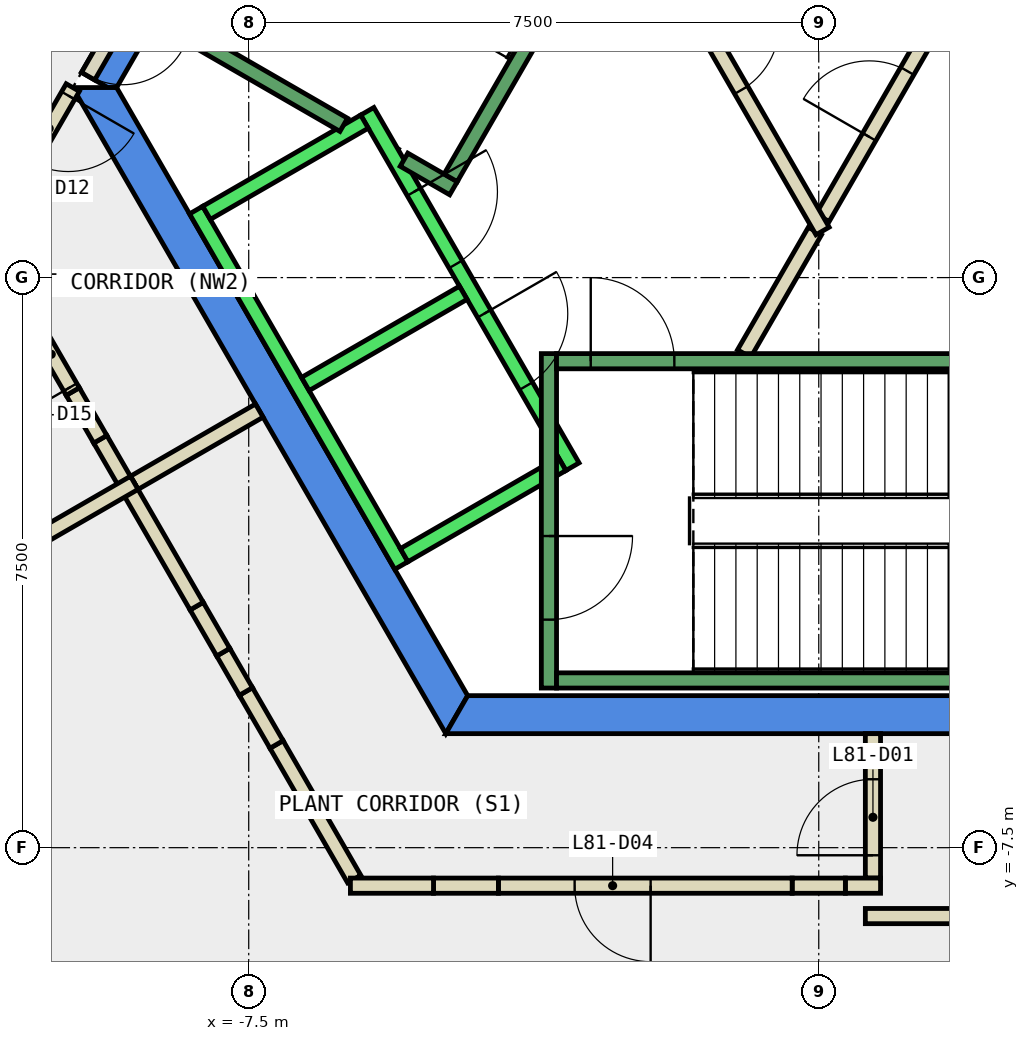
"""IFC4 building model, lengths in metres.
Left out: names, types, materials, properties, quantities, classifications, styles, units other than length and angle.
Written with IfcOpenShell. Run it as: python <this file> out.ifc"""

import sys

from ifc_helpers import new_model, si_unit, direction, frame, frame_2d, origin, place, context, subcontext, project, spatial, polyline, rectangle, outline, extrude, element, fill, save


model = new_model("IFC4")
c1 = context("Model", 3, precision=1e-05, world=origin(), true_north=direction((0.0, 1.0)))
c2 = subcontext(c1, "Body", "Model", "MODEL_VIEW")
j1 = project(units=[si_unit("LENGTHUNIT", "METRE"), si_unit("PLANEANGLEUNIT", "RADIAN")], contexts=[c1])
p1 = place(None, origin())
s1 = spatial("IfcSite", under=j1, at=p1, CompositionType="ELEMENT")
p2 = place(p1, origin())
s2 = spatial("IfcBuilding", under=s1, at=p2, CompositionType="ELEMENT")
p3 = place(p2, frame((0.0, 0.0, 344.9)))
s3 = spatial("IfcBuildingStorey", under=s2, at=p3, CompositionType="ELEMENT", Elevation=344.9)
p4 = place(p3, frame((0.0, 0.0, 3.6)))
e1 = element("IfcWall", 1, at=p4, inside=s3, PredefinedType="SHEAR", context=c2, shape_type="SweptSolid", body=[
    extrude(outline(polyline([(-9.7, 2.7), (-9.354, 2.5), (-9.238, 2.5), (-8.803, 3.253), (-9.236, 3.502), (-9.7, 2.7)])), origin(), (0.0, 0.0, 1.0), 0.45),
])
p5 = place(p3, frame((0.0, 0.0, -0.35)))
e2 = element("IfcWall", 2, at=p5, inside=s3, PredefinedType="SHEAR", context=c2, shape_type="SweptSolid", body=[
    extrude(outline(polyline([(-9.815, 2.5), (-4.907, -6.0), (-4.619, -5.5), (-9.238, 2.5), (-9.815, 2.5)])), origin(), (0.0, 0.0, 1.0), 4.4),
])
p6 = place(p3, frame((0.0, 0.0, -0.35)))
e3 = element("IfcWall", 3, at=p6, inside=s3, PredefinedType="SHEAR", context=c2, shape_type="SweptSolid", body=[
    extrude(outline(polyline([(3.75, -6.0), (3.75, -5.5), (-4.619, -5.5), (-4.907, -6.0), (3.75, -6.0)])), origin(), (0.0, 0.0, 1.0), 4.4),
])
p7 = place(p3, frame((-0.982, -1.0, 0.0), z_axis=(0.0, 0.0, 1.0), x_axis=(0.50024047865, 0.865886518847, 0.0)))
e4 = element("IfcWall", 4, at=p7, inside=s3, PredefinedType="PARTITIONING", context=c2, shape_type="SweptSolid", body=[
    extrude(rectangle(XDim=1.863, YDim=0.2, at=frame_2d((0.931, 0.0))), origin(), (0.0, 0.0, 1.0), 4.05),
])
p8 = place(p3, frame((0.05, 0.787, 0.0), z_axis=(0.0, 0.0, 1.0), x_axis=(0.499954076797, 0.866051915934, 0.0)))
e5 = element("IfcWall", 5, at=p8, inside=s3, PredefinedType="PARTITIONING", context=c2, shape_type="SweptSolid", body=[
    extrude(rectangle(XDim=3.558, YDim=0.2, at=frame_2d((1.779, 0.0))), origin(), (0.0, 0.0, 1.0), 4.05),
])
p9 = place(p8, frame((1.229, 0.0, 0.0)))
e6 = element("IfcOpeningElement", 6, at=p9, cuts=e5, PredefinedType="OPENING", context=c2, shape_type="SweptSolid", body=[
    extrude(rectangle(XDim=1.0, YDim=2.1, at=frame_2d((0.5, 1.05))), frame((0.0, 0.11, 0.0), z_axis=(0.0, -1.0, 0.0), x_axis=(1.0, 0.0, 0.0)), (0.0, 0.0, 1.0), 0.22),
])
p10 = place(p3, frame((-2.54, 5.1, 0.0), z_axis=(0.0, 0.0, 1.0), x_axis=(0.499925051871, -0.866068670783, 0.0)))
e7 = element("IfcWall", 7, at=p10, inside=s3, PredefinedType="PARTITIONING", context=c2, shape_type="SweptSolid", body=[
    extrude(rectangle(XDim=5.181, YDim=0.2, at=frame_2d((2.59, 0.0))), origin(), (0.0, 0.0, 1.0), 4.05),
])
p11 = place(p10, frame((2.04, 0.0, 0.0)))
e8 = element("IfcOpeningElement", 8, at=p11, cuts=e7, PredefinedType="OPENING", context=c2, shape_type="SweptSolid", body=[
    extrude(rectangle(XDim=1.0, YDim=2.1, at=frame_2d((0.5, 1.05))), frame((0.0, 0.11, 0.0), z_axis=(0.0, -1.0, 0.0), x_axis=(1.0, 0.0, 0.0)), (0.0, 0.0, 1.0), 0.22),
])
p12 = place(p3, frame((0.713, -7.9, 0.0), z_axis=(0.0, 0.0, 1.0), x_axis=(0.0, 1.0, 0.0)))
e9 = element("IfcWall", 9, at=p12, inside=s3, PredefinedType="PARTITIONING", context=c2, shape_type="SweptSolid", body=[
    extrude(rectangle(XDim=1.9, YDim=0.2, at=frame_2d((0.95, 0.0))), origin(), (0.0, 0.0, 1.0), 4.05),
])
p13 = place(p12, frame((0.3, 0.0, 0.0)))
e10 = element("IfcOpeningElement", 10, at=p13, cuts=e9, PredefinedType="OPENING", context=c2, shape_type="SweptSolid", body=[
    extrude(rectangle(XDim=1.0, YDim=2.1, at=frame_2d((0.5, 1.05))), frame((0.0, 0.11, 0.0), z_axis=(0.0, -1.0, 0.0), x_axis=(1.0, 0.0, 0.0)), (0.0, 0.0, 1.0), 0.22),
])
p14 = place(p3, frame((1.944, -8.4, 0.0), z_axis=(0.0, 0.0, 1.0), x_axis=(-1.0, 0.0, 0.0)))
e11 = element("IfcWall", 11, at=p14, inside=s3, PredefinedType="PARTITIONING", context=c2, shape_type="SweptSolid", body=[
    extrude(rectangle(XDim=1.331, YDim=0.2, at=frame_2d((0.666, 0.0))), origin(), (0.0, 0.0, 1.0), 4.05),
])
p15 = place(p3, frame((0.813, -8.0, 0.0), z_axis=(0.0, 0.0, 1.0), x_axis=(-1.0, 0.0, 0.0)))
e12 = element("IfcWall", 12, at=p15, inside=s3, PredefinedType="PARTITIONING", context=c2, shape_type="SweptSolid", body=[
    extrude(rectangle(XDim=0.463, YDim=0.2, at=frame_2d((0.231, 0.0))), origin(), (0.0, 0.0, 1.0), 4.05),
])
p16 = place(p3, frame((-6.112, -7.913, 0.0), z_axis=(0.0, 0.0, 1.0), x_axis=(-0.499812034598, 0.866133898465, 0.0)))
e13 = element("IfcWall", 13, at=p16, inside=s3, PredefinedType="PARTITIONING", context=c2, shape_type="SweptSolid", body=[
    extrude(rectangle(XDim=2.045, YDim=0.2, at=frame_2d((1.022, 0.0))), origin(), (0.0, 0.0, 1.0), 4.05),
])
p17 = place(p3, frame((-9.006, -2.7, 0.0), z_axis=(0.0, 0.0, 1.0), x_axis=(0.865980106173, 0.500078449558, 0.0)))
e14 = element("IfcWall", 14, at=p17, inside=s3, PredefinedType="PARTITIONING", context=c2, shape_type="SweptSolid", body=[
    extrude(rectangle(XDim=1.9, YDim=0.2, at=frame_2d((0.95, 0.0))), origin(), (0.0, 0.0, 1.0), 4.05),
])
p18 = place(p3, frame((-9.815, 2.5, 0.0), z_axis=(0.0, 0.0, 1.0), x_axis=(-0.500061536317, -0.86598987286, 0.0)))
e15 = element("IfcWall", 15, at=p18, inside=s3, PredefinedType="PARTITIONING", context=c2, shape_type="SweptSolid", body=[
    extrude(rectangle(XDim=2.41, YDim=0.2, at=frame_2d((1.205, 0.0))), origin(), (0.0, 0.0, 1.0), 4.05),
])
p19 = place(p18, frame((0.121, 0.0, 0.0)))
e16 = element("IfcOpeningElement", 16, at=p19, cuts=e15, PredefinedType="OPENING", context=c2, shape_type="SweptSolid", body=[
    extrude(rectangle(XDim=1.0, YDim=2.1, at=frame_2d((0.5, 1.05))), frame((0.0, 0.11, 0.0), z_axis=(0.0, -1.0, 0.0), x_axis=(1.0, 0.0, 0.0)), (0.0, 0.0, 1.0), 0.22),
])
p20 = place(p3, frame((-9.093, -2.75, 0.0), z_axis=(0.0, 0.0, 1.0), x_axis=(-0.500153222552, 0.865936922628, 0.0)))
e17 = element("IfcWall", 17, at=p20, inside=s3, PredefinedType="PARTITIONING", context=c2, shape_type="SweptSolid", body=[
    extrude(rectangle(XDim=0.719, YDim=0.2, at=frame_2d((0.36, 0.0))), origin(), (0.0, 0.0, 1.0), 4.05),
])
p21 = place(p3, frame((-9.15, 3.452, 0.0), z_axis=(0.0, 0.0, 1.0), x_axis=(-0.500079945886, -0.865979242085, 0.0)))
e18 = element("IfcWall", 18, at=p21, inside=s3, PredefinedType="PARTITIONING", context=c2, shape_type="SweptSolid", body=[
    extrude(rectangle(XDim=0.926, YDim=0.2, at=frame_2d((0.463, 0.0))), origin(), (0.0, 0.0, 1.0), 2.4),
])
p22 = place(p21, frame((0.017, 0.0, 0.0)))
e19 = element("IfcOpeningElement", 19, at=p22, cuts=e18, PredefinedType="OPENING", context=c2, shape_type="SweptSolid", body=[
    extrude(rectangle(XDim=0.9, YDim=2.1, at=frame_2d((0.45, 1.05))), frame((0.0, 0.11, 0.0), z_axis=(0.0, -1.0, 0.0), x_axis=(1.0, 0.0, 0.0)), (0.0, 0.0, 1.0), 0.22),
])
p23 = place(p3, frame((0.35, -8.0, 0.0), z_axis=(0.0, 0.0, 1.0), x_axis=(-1.0, 0.0, 0.0)))
e20 = element("IfcWall", 20, at=p23, inside=s3, PredefinedType="PARTITIONING", context=c2, shape_type="SweptSolid", body=[
    extrude(rectangle(XDim=0.7, YDim=0.2, at=frame_2d((0.35, 0.0))), origin(), (0.0, 0.0, 1.0), 1.95),
])
p24 = place(p3, frame((-0.35, -8.0, 0.0), z_axis=(0.0, 0.0, 1.0), x_axis=(-1.0, 0.0, 0.0)))
e21 = element("IfcWall", 21, at=p24, inside=s3, PredefinedType="PARTITIONING", context=c2, shape_type="SweptSolid", body=[
    extrude(rectangle(XDim=3.865, YDim=0.2, at=frame_2d((1.933, 0.0))), origin(), (0.0, 0.0, 1.0), 4.05),
])
p25 = place(p24, frame((1.862, 0.0, 0.0)))
e22 = element("IfcOpeningElement", 22, at=p25, cuts=e21, PredefinedType="OPENING", context=c2, shape_type="SweptSolid", body=[
    extrude(rectangle(XDim=1.0, YDim=2.1, at=frame_2d((0.5, 1.05))), frame((0.0, 0.11, 0.0), z_axis=(0.0, -1.0, 0.0), x_axis=(1.0, 0.0, 0.0)), (0.0, 0.0, 1.0), 0.22),
])
p26 = place(p3, frame((-4.215, -8.0, 0.0), z_axis=(0.0, 0.0, 1.0), x_axis=(-1.0, 0.0, 0.0)))
e23 = element("IfcWall", 23, at=p26, inside=s3, PredefinedType="PARTITIONING", context=c2, shape_type="SweptSolid", body=[
    extrude(rectangle(XDim=0.854, YDim=0.2, at=frame_2d((0.427, 0.0))), origin(), (0.0, 0.0, 1.0), 1.95),
])
p27 = place(p3, frame((-5.069, -8.0, 0.0), z_axis=(0.0, 0.0, 1.0), x_axis=(-1.0, 0.0, 0.0)))
e24 = element("IfcWall", 24, at=p27, inside=s3, PredefinedType="PARTITIONING", context=c2, shape_type="SweptSolid", body=[
    extrude(rectangle(XDim=1.093, YDim=0.2, at=frame_2d((0.546, 0.0))), origin(), (0.0, 0.0, 1.0), 4.05),
])
p28 = place(p3, frame((-7.134, -6.142, 0.0), z_axis=(0.0, 0.0, 1.0), x_axis=(-0.500605921862, 0.865675291894, 0.0)))
e25 = element("IfcWall", 25, at=p28, inside=s3, PredefinedType="PARTITIONING", context=c2, shape_type="SweptSolid", body=[
    extrude(rectangle(XDim=0.805, YDim=0.2, at=frame_2d((0.403, 0.0))), origin(), (0.0, 0.0, 1.0), 1.95),
])
p29 = place(p3, frame((-7.537, -5.445, 0.0), z_axis=(0.0, 0.0, 1.0), x_axis=(-0.499132035552, 0.866525943689, 0.0)))
e26 = element("IfcWall", 26, at=p29, inside=s3, PredefinedType="PARTITIONING", context=c2, shape_type="SweptSolid", body=[
    extrude(rectangle(XDim=0.597, YDim=0.2, at=frame_2d((0.298, 0.0))), origin(), (0.0, 0.0, 1.0), 4.05),
])
p30 = place(p3, frame((-7.835, -4.928, 0.0), z_axis=(0.0, 0.0, 1.0), x_axis=(-0.500265973451, 0.865871789474, 0.0)))
e27 = element("IfcWall", 27, at=p30, inside=s3, PredefinedType="PARTITIONING", context=c2, shape_type="SweptSolid", body=[
    extrude(rectangle(XDim=0.7, YDim=0.2, at=frame_2d((0.35, 0.0))), origin(), (0.0, 0.0, 1.0), 1.95),
])
p31 = place(p3, frame((-8.185, -4.322, 0.0), z_axis=(0.0, 0.0, 1.0), x_axis=(-0.500145398563, 0.865941441609, 0.0)))
e28 = element("IfcWall", 28, at=p31, inside=s3, PredefinedType="PARTITIONING", context=c2, shape_type="SweptSolid", body=[
    extrude(rectangle(XDim=1.815, YDim=0.2, at=frame_2d((0.908, 0.0))), origin(), (0.0, 0.0, 1.0), 4.05),
])
p32 = place(p3, frame((-18.407, -8.127, 0.0), z_axis=(0.0, 0.0, 1.0), x_axis=(0.866049258168, 0.49995868072, 0.0)))
e29 = element("IfcWall", 29, at=p32, inside=s3, PredefinedType="PARTITIONING", context=c2, shape_type="SweptSolid", body=[
    extrude(rectangle(XDim=10.855, YDim=0.2, at=frame_2d((5.427, 0.0))), origin(), (0.0, 0.0, 1.0), 4.05),
])
p33 = place(p3, frame((-9.453, -2.127, 0.0), z_axis=(0.0, 0.0, 1.0), x_axis=(-0.499508606083, 0.866308924373, 0.0)))
e30 = element("IfcWall", 30, at=p33, inside=s3, PredefinedType="PARTITIONING", context=c2, shape_type="SweptSolid", body=[
    extrude(rectangle(XDim=0.725, YDim=0.2, at=frame_2d((0.362, 0.0))), origin(), (0.0, 0.0, 1.0), 1.95),
])
p34 = place(p3, frame((-9.815, -1.499, 0.0), z_axis=(0.0, 0.0, 1.0), x_axis=(-0.50057098838, 0.865695492418, 0.0)))
e31 = element("IfcWall", 31, at=p34, inside=s3, PredefinedType="PARTITIONING", context=c2, shape_type="SweptSolid", body=[
    extrude(rectangle(XDim=1.345, YDim=0.2, at=frame_2d((0.672, 0.0))), origin(), (0.0, 0.0, 1.0), 4.05),
])
p35 = place(p34, frame((0.066, 0.0, 0.0)))
e32 = element("IfcOpeningElement", 32, at=p35, cuts=e31, PredefinedType="OPENING", context=c2, shape_type="SweptSolid", body=[
    extrude(rectangle(XDim=1.0, YDim=2.1, at=frame_2d((0.5, 1.05))), frame((0.0, 0.11, 0.0), z_axis=(0.0, -1.0, 0.0), x_axis=(1.0, 0.0, 0.0)), (0.0, 0.0, 1.0), 0.22),
])
p36 = place(p3, frame((-5.94, 2.188, 0.0), z_axis=(0.0, 0.0, 1.0), x_axis=(0.500034260056, -0.866005622828, 0.0)))
e33 = element("IfcWall", 33, at=p36, inside=s3, PredefinedType="STANDARD", context=c2, shape_type="SweptSolid", body=[
    extrude(rectangle(XDim=5.399, YDim=0.2, at=frame_2d((2.7, 0.0))), origin(), (0.0, 0.0, 1.0), 4.05),
])
p37 = place(p36, frame((3.075, 0.0, 0.0)))
e34 = element("IfcOpeningElement", 34, at=p37, cuts=e33, PredefinedType="OPENING", context=c2, shape_type="SweptSolid", body=[
    extrude(rectangle(XDim=1.1, YDim=2.1, at=frame_2d((0.55, 1.05))), frame((0.0, 0.11, 0.0), z_axis=(0.0, -1.0, 0.0), x_axis=(1.0, 0.0, 0.0)), (0.0, 0.0, 1.0), 0.22),
])
p38 = place(p36, frame((1.225, 0.0, 0.0)))
e35 = element("IfcOpeningElement", 35, at=p38, cuts=e33, PredefinedType="OPENING", context=c2, shape_type="SweptSolid", body=[
    extrude(rectangle(XDim=1.1, YDim=2.1, at=frame_2d((0.55, 1.05))), frame((0.0, 0.11, 0.0), z_axis=(0.0, -1.0, 0.0), x_axis=(1.0, 0.0, 0.0)), (0.0, 0.0, 1.0), 0.22),
])
p39 = place(p3, frame((-8.192, 0.888, 0.0), z_axis=(0.0, 0.0, 1.0), x_axis=(0.500034260056, -0.866005622828, 0.0)))
e36 = element("IfcWall", 36, at=p39, inside=s3, PredefinedType="STANDARD", context=c2, shape_type="SweptSolid", body=[
    extrude(rectangle(XDim=5.399, YDim=0.2, at=frame_2d((2.7, 0.0))), origin(), (0.0, 0.0, 1.0), 4.05),
])
for number, where, z_axis, x_axis in (
    (37, (-5.977, 2.052, 0.0), (0.0, 0.0, 1.0), (-0.866, -0.5, 0.0)),
    (38, (-4.677, -0.2, 0.0), (0.0, 0.0, 1.0), (-0.866, -0.5, 0.0)),
):
    element("IfcWall", number, at=place(p3, frame(where, z_axis=z_axis, x_axis=x_axis)), inside=s3, PredefinedType="STANDARD", context=c2, shape_type="SweptSolid", body=[
        extrude(rectangle(XDim=2.399, YDim=0.2, at=frame_2d((1.2, 0.0))), origin(), (0.0, 0.0, 1.0), 4.05),
    ])
p40 = place(p3, frame((-3.377, -2.452, 0.0), z_axis=(0.0, 0.0, 1.0), x_axis=(-0.865955154139, -0.50012165622, 0.0)))
e39 = element("IfcWall", 39, at=p40, inside=s3, PredefinedType="STANDARD", context=c2, shape_type="SweptSolid", body=[
    extrude(rectangle(XDim=2.4, YDim=0.2, at=frame_2d((1.2, 0.0))), origin(), (0.0, 0.0, 1.0), 4.05),
])
p41 = place(p3, frame((-3.55, -1.0, 0.0), z_axis=(0.0, 0.0, 1.0), x_axis=(0.0, -1.0, 0.0)))
e40 = element("IfcWall", 40, at=p41, inside=s3, PredefinedType="STANDARD", context=c2, shape_type="SweptSolid", body=[
    extrude(rectangle(XDim=4.4, YDim=0.2, at=frame_2d((2.2, 0.0))), origin(), (0.0, 0.0, 1.0), 4.05),
])
p42 = place(p41, frame((2.4, 0.0, 0.0)))
e41 = element("IfcOpeningElement", 41, at=p42, cuts=e40, PredefinedType="OPENING", context=c2, shape_type="SweptSolid", body=[
    extrude(rectangle(XDim=1.1, YDim=2.2, at=frame_2d((0.55, 1.1))), frame((0.0, 0.11, 0.0), z_axis=(0.0, -1.0, 0.0), x_axis=(1.0, 0.0, 0.0)), (0.0, 0.0, 1.0), 0.22),
])
p43 = place(p3, frame((-3.45, -1.1, 0.0), z_axis=(0.0, 0.0, 1.0), x_axis=(1.0, 0.0, 0.0)))
e42 = element("IfcWall", 42, at=p43, inside=s3, PredefinedType="STANDARD", context=c2, shape_type="SweptSolid", body=[
    extrude(rectangle(XDim=6.9, YDim=0.2, at=frame_2d((3.45, 0.0))), origin(), (0.0, 0.0, 1.0), 4.05),
])
p44 = place(p43, frame((0.45, 0.0, 0.0)))
e43 = element("IfcOpeningElement", 43, at=p44, cuts=e42, PredefinedType="OPENING", context=c2, shape_type="SweptSolid", body=[
    extrude(rectangle(XDim=1.1, YDim=2.2, at=frame_2d((0.55, 1.1))), frame((0.0, 0.11, 0.0), z_axis=(0.0, -1.0, 0.0), x_axis=(1.0, 0.0, 0.0)), (0.0, 0.0, 1.0), 0.22),
])
p45 = place(p3, frame((-3.45, -5.3, 0.0), z_axis=(0.0, 0.0, 1.0), x_axis=(1.0, 0.0, 0.0)))
e44 = element("IfcWall", 44, at=p45, inside=s3, PredefinedType="STANDARD", context=c2, shape_type="SweptSolid", body=[
    extrude(rectangle(XDim=6.9, YDim=0.2, at=frame_2d((3.45, 0.0))), origin(), (0.0, 0.0, 1.0), 4.05),
])
p46 = place(p3, frame((4.843, 1.312, 0.0), z_axis=(0.0, 0.0, 1.0), x_axis=(-0.499963383562, 0.866046543262, 0.0)))
e45 = element("IfcWall", 45, at=p46, inside=s3, PredefinedType="STANDARD", context=c2, shape_type="SweptSolid", body=[
    extrude(rectangle(XDim=6.9, YDim=0.2, at=frame_2d((3.45, 0.0))), origin(), (0.0, 0.0, 1.0), 4.05),
])
p47 = place(p46, frame((0.45, 0.0, 0.0)))
e46 = element("IfcOpeningElement", 46, at=p47, cuts=e45, PredefinedType="OPENING", context=c2, shape_type="SweptSolid", body=[
    extrude(rectangle(XDim=1.1, YDim=2.2, at=frame_2d((0.55, 1.1))), frame((0.0, 0.11, 0.0), z_axis=(0.0, -1.0, 0.0), x_axis=(1.0, 0.0, 0.0)), (0.0, 0.0, 1.0), 0.22),
])
p48 = place(p3, frame((-6.25, 2.01, 0.0), z_axis=(0.0, 0.0, 1.0), x_axis=(-0.86611865017, 0.499838457731, 0.0)))
e47 = element("IfcWall", 47, at=p48, inside=s3, PredefinedType="STANDARD", context=c2, shape_type="SweptSolid", body=[
    extrude(rectangle(XDim=2.733, YDim=0.2, at=frame_2d((1.366, 0.0))), origin(), (0.0, 0.0, 1.0), 4.05),
])
p49 = place(p3, frame((-4.806, 1.176, 0.0), z_axis=(0.0, 0.0, 1.0), x_axis=(-0.866558586415, 0.499075361355, 0.0)))
e48 = element("IfcWall", 48, at=p49, inside=s3, PredefinedType="STANDARD", context=c2, shape_type="SweptSolid", body=[
    extrude(rectangle(XDim=0.751, YDim=0.2, at=frame_2d((0.376, 0.0))), origin(), (0.0, 0.0, 1.0), 4.05),
])
p50 = place(p3, frame((-1.393, 7.288, 0.0), z_axis=(0.0, 0.0, 1.0), x_axis=(-0.499963383562, -0.866046543262, 0.0)))
e49 = element("IfcWall", 49, at=p50, inside=s3, PredefinedType="STANDARD", context=c2, shape_type="SweptSolid", body=[
    extrude(rectangle(XDim=6.9, YDim=0.2, at=frame_2d((3.45, 0.0))), origin(), (0.0, 0.0, 1.0), 4.05),
])
p51 = place(p50, frame((0.45, 0.0, 0.0)))
e50 = element("IfcOpeningElement", 50, at=p51, cuts=e49, PredefinedType="OPENING", context=c2, shape_type="SweptSolid", body=[
    extrude(rectangle(XDim=1.1, YDim=2.2, at=frame_2d((0.55, 1.1))), frame((0.0, 0.11, 0.0), z_axis=(0.0, -1.0, 0.0), x_axis=(1.0, 0.0, 0.0)), (0.0, 0.0, 1.0), 0.22),
])
p52 = place(p13, origin())
e51 = element("IfcDoor", 51, at=p52, inside=s3, OperationType="SINGLE_SWING_LEFT", PredefinedType="DOOR", context=c2, shape_type="SweptSolid", body=[
    extrude(rectangle(XDim=1.0, YDim=2.1, at=frame_2d((0.5, 1.05))), frame((0.0, 0.025, 0.0), z_axis=(0.0, -1.0, 0.0), x_axis=(1.0, 0.0, 0.0)), (0.0, 0.0, 1.0), 0.05),
])
fill(e10, e51)
p53 = place(p25, origin())
e52 = element("IfcDoor", 52, at=p53, inside=s3, OperationType="SINGLE_SWING_RIGHT", PredefinedType="DOOR", context=c2, shape_type="SweptSolid", body=[
    extrude(rectangle(XDim=1.0, YDim=2.1, at=frame_2d((0.5, 1.05))), frame((0.0, 0.025, 0.0), z_axis=(0.0, -1.0, 0.0), x_axis=(1.0, 0.0, 0.0)), (0.0, 0.0, 1.0), 0.05),
])
fill(e22, e52)
p54 = place(p19, origin())
e53 = element("IfcDoor", 53, at=p54, inside=s3, OperationType="SINGLE_SWING_RIGHT", PredefinedType="DOOR", context=c2, shape_type="SweptSolid", body=[
    extrude(rectangle(XDim=1.0, YDim=2.1, at=frame_2d((0.5, 1.05))), frame((0.0, 0.025, 0.0), z_axis=(0.0, -1.0, 0.0), x_axis=(1.0, 0.0, 0.0)), (0.0, 0.0, 1.0), 0.05),
])
fill(e16, e53)
p55 = place(p35, origin())
e54 = element("IfcDoor", 54, at=p55, inside=s3, OperationType="SINGLE_SWING_LEFT", PredefinedType="DOOR", context=c2, shape_type="SweptSolid", body=[
    extrude(rectangle(XDim=1.0, YDim=2.1, at=frame_2d((0.5, 1.05))), frame((0.0, 0.025, 0.0), z_axis=(0.0, -1.0, 0.0), x_axis=(1.0, 0.0, 0.0)), (0.0, 0.0, 1.0), 0.05),
])
fill(e32, e54)
p56 = place(p9, origin())
e55 = element("IfcDoor", 55, at=p56, inside=s3, OperationType="SINGLE_SWING_RIGHT", PredefinedType="DOOR", context=c2, shape_type="SweptSolid", body=[
    extrude(rectangle(XDim=1.0, YDim=2.1, at=frame_2d((0.5, 1.05))), frame((0.0, 0.025, 0.0), z_axis=(0.0, -1.0, 0.0), x_axis=(1.0, 0.0, 0.0)), (0.0, 0.0, 1.0), 0.05),
])
fill(e6, e55)
p57 = place(p11, origin())
e56 = element("IfcDoor", 56, at=p57, inside=s3, OperationType="SINGLE_SWING_RIGHT", PredefinedType="DOOR", context=c2, shape_type="SweptSolid", body=[
    extrude(rectangle(XDim=1.0, YDim=2.1, at=frame_2d((0.5, 1.05))), frame((0.0, 0.025, 0.0), z_axis=(0.0, -1.0, 0.0), x_axis=(1.0, 0.0, 0.0)), (0.0, 0.0, 1.0), 0.05),
])
fill(e8, e56)
p58 = place(p22, origin())
e57 = element("IfcDoor", 57, at=p58, inside=s3, OperationType="SINGLE_SWING_LEFT", PredefinedType="DOOR", context=c2, shape_type="SweptSolid", body=[
    extrude(rectangle(XDim=0.9, YDim=2.1, at=frame_2d((0.45, 1.05))), frame((0.0, 0.025, 0.0), z_axis=(0.0, -1.0, 0.0), x_axis=(1.0, 0.0, 0.0)), (0.0, 0.0, 1.0), 0.05),
])
fill(e19, e57)
p59 = place(p37, origin())
e58 = element("IfcDoor", 58, at=p59, inside=s3, OperationType="SLIDING_TO_LEFT", PredefinedType="DOOR", context=c2, shape_type="SweptSolid", body=[
    extrude(rectangle(XDim=1.1, YDim=2.1, at=frame_2d((0.55, 1.05))), frame((0.0, 0.025, 0.0), z_axis=(0.0, -1.0, 0.0), x_axis=(1.0, 0.0, 0.0)), (0.0, 0.0, 1.0), 0.05),
])
fill(e34, e58)
p60 = place(p38, origin())
e59 = element("IfcDoor", 59, at=p60, inside=s3, OperationType="SLIDING_TO_LEFT", PredefinedType="DOOR", context=c2, shape_type="SweptSolid", body=[
    extrude(rectangle(XDim=1.1, YDim=2.1, at=frame_2d((0.55, 1.05))), frame((0.0, 0.025, 0.0), z_axis=(0.0, -1.0, 0.0), x_axis=(1.0, 0.0, 0.0)), (0.0, 0.0, 1.0), 0.05),
])
fill(e35, e59)
p61 = place(p44, origin())
e60 = element("IfcDoor", 60, at=p61, inside=s3, OperationType="SINGLE_SWING_LEFT", PredefinedType="DOOR", context=c2, shape_type="SweptSolid", body=[
    extrude(rectangle(XDim=1.1, YDim=2.2, at=frame_2d((0.55, 1.1))), frame((0.0, 0.025, 0.0), z_axis=(0.0, -1.0, 0.0), x_axis=(1.0, 0.0, 0.0)), (0.0, 0.0, 1.0), 0.05),
])
fill(e43, e60)
p62 = place(p42, origin())
e61 = element("IfcDoor", 61, at=p62, inside=s3, OperationType="SINGLE_SWING_LEFT", PredefinedType="DOOR", context=c2, shape_type="SweptSolid", body=[
    extrude(rectangle(XDim=1.1, YDim=2.2, at=frame_2d((0.55, 1.1))), frame((0.0, 0.025, 0.0), z_axis=(0.0, -1.0, 0.0), x_axis=(1.0, 0.0, 0.0)), (0.0, 0.0, 1.0), 0.05),
])
fill(e41, e61)
save(model, sys.argv[1])
